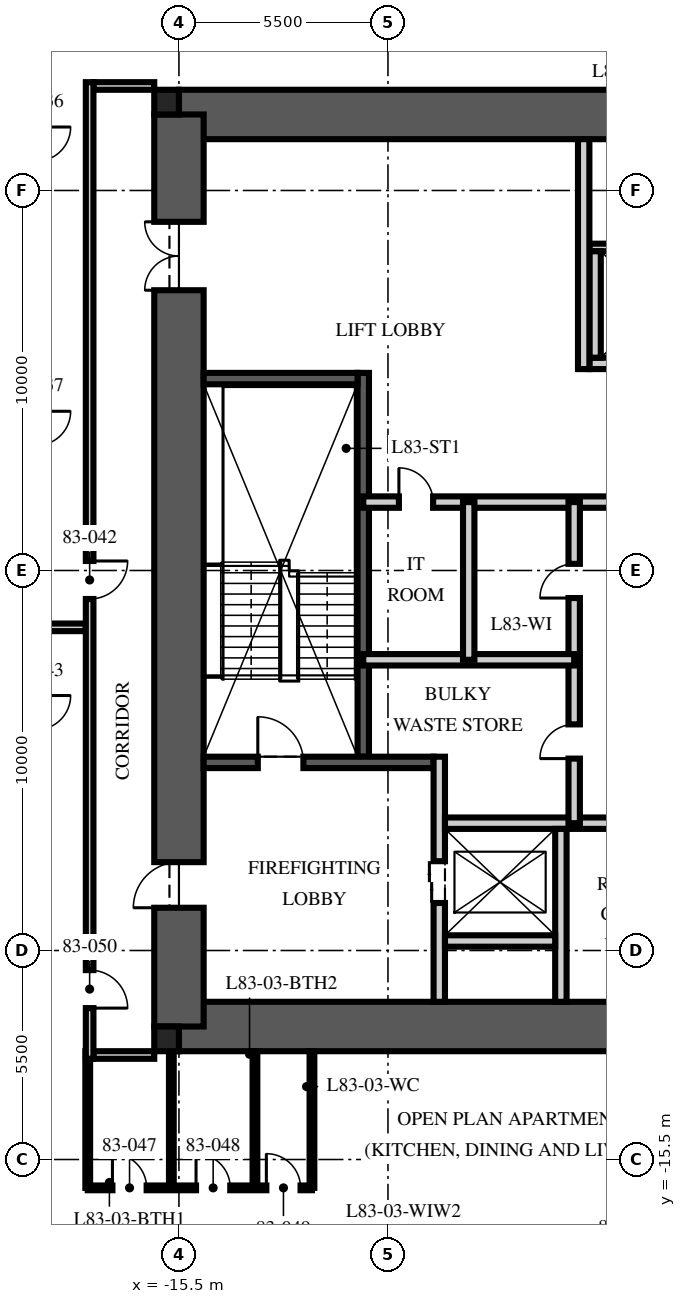
"""IFC4 building model, lengths in metres.
Left out: names, types, materials, properties, quantities, classifications, styles, units other than length and angle.
Written with IfcOpenShell. Run it as: python <this file> out.ifc"""

import sys

from ifc_helpers import new_model, si_unit, direction, frame, frame_2d, origin, origin_2d, place, context, subcontext, project, spatial, rectangle, extrude, element, fill, save


model = new_model("IFC4")
c1 = context("Model", 3, precision=1e-05, world=origin(), true_north=direction((0.0, 1.0)))
c2 = subcontext(c1, "Body", "Model", "MODEL_VIEW")
j1 = project(units=[si_unit("LENGTHUNIT", "METRE"), si_unit("PLANEANGLEUNIT", "RADIAN")], contexts=[c1])
p1 = place(None, origin())
s1 = spatial("IfcSite", under=j1, at=p1, CompositionType="ELEMENT")
p2 = place(p1, origin())
s2 = spatial("IfcBuilding", under=s1, at=p2, CompositionType="ELEMENT")
p3 = place(p2, frame((0.0, 0.0, 330.75)))
s3 = spatial("IfcBuildingStorey", under=s2, at=p3, CompositionType="ELEMENT", Elevation=330.75)
for number, where, z_axis, x_axis in (
    (1, (-15.5, 12.0, -0.25), (0.0, 0.0, 1.0), (1.0, 0.0, 0.0)),
    (2, (-15.5, -12.0, -0.25), (0.0, 0.0, 1.0), (1.0, 0.0, 0.0)),
):
    element("IfcWall", number, at=place(p3, frame(where, z_axis=z_axis, x_axis=x_axis)), inside=s3, PredefinedType="SHEAR", context=c2, shape_type="SweptSolid", body=[
        extrude(rectangle(XDim=31.0, YDim=1.3, at=frame_2d((15.5, 0.0))), origin(), (0.0, 0.0, 1.0), 3.75),
    ])
p4 = place(p3, frame((-15.5, -12.0, -0.25), z_axis=(0.0, 0.0, 1.0), x_axis=(0.0, 1.0, 0.0)))
e3 = element("IfcWall", 3, at=p4, inside=s3, PredefinedType="SHEAR", context=c2, shape_type="SweptSolid", body=[
    extrude(rectangle(XDim=24.0, YDim=1.3, at=frame_2d((12.0, 0.0))), origin(), (0.0, 0.0, 1.0), 3.75),
])
p5 = place(p4, frame((3.125, 0.0, 0.25)))
e4 = element("IfcOpeningElement", 4, at=p5, cuts=e3, PredefinedType="OPENING", context=c2, shape_type="SweptSolid", body=[
    extrude(rectangle(XDim=1.2, YDim=2.1, at=frame_2d((0.6, 1.05))), frame((0.0, 0.66, 0.0), z_axis=(0.0, -1.0, 0.0), x_axis=(1.0, 0.0, 0.0)), (0.0, 0.0, 1.0), 1.32),
])
p6 = place(p4, frame((19.375, 0.0, 0.25)))
e5 = element("IfcOpeningElement", 5, at=p6, cuts=e3, PredefinedType="OPENING", context=c2, shape_type="SweptSolid", body=[
    extrude(rectangle(XDim=1.8, YDim=2.1, at=frame_2d((0.9, 1.05))), frame((0.0, 0.66, 0.0), z_axis=(0.0, -1.0, 0.0), x_axis=(1.0, 0.0, 0.0)), (0.0, 0.0, 1.0), 1.32),
])
for number, where, z_axis, x_axis in (
    (6, (-15.825, 12.325, -0.25), (0.0, 0.0, 1.0), (1.0, 0.0, 0.0)),
    (7, (-15.825, -12.325, -0.25), (0.0, 0.0, 1.0), (1.0, 0.0, 0.0)),
):
    element("IfcColumn", number, at=place(p3, frame(where, z_axis=z_axis, x_axis=x_axis)), inside=s3, PredefinedType="COLUMN", context=c2, shape_type="SweptSolid", body=[
        extrude(rectangle(XDim=0.65, YDim=0.65, at=origin_2d()), origin(), (0.0, 0.0, 1.0), 3.75),
    ])
p7 = place(p3, frame((-10.65, -4.9, 0.0), z_axis=(0.0, 0.0, 1.0), x_axis=(0.0, 1.0, 0.0)))
e8 = element("IfcWall", 8, at=p7, inside=s3, PredefinedType="SOLIDWALL", context=c2, shape_type="SweptSolid", body=[
    extrude(rectangle(XDim=10.1, YDim=0.3, at=frame_2d((5.05, 0.0))), origin(), (0.0, 0.0, 1.0), 3.5),
])
p8 = place(p3, frame((-14.85, -5.05, 0.0), z_axis=(0.0, 0.0, 1.0), x_axis=(1.0, 0.0, 0.0)))
e9 = element("IfcWall", 9, at=p8, inside=s3, PredefinedType="SOLIDWALL", context=c2, shape_type="SweptSolid", body=[
    extrude(rectangle(XDim=6.05, YDim=0.3, at=frame_2d((3.025, 0.0))), origin(), (0.0, 0.0, 1.0), 3.5),
])
p9 = place(p8, frame((1.425, 0.0, 0.0)))
e10 = element("IfcOpeningElement", 10, at=p9, cuts=e9, PredefinedType="OPENING", context=c2, shape_type="SweptSolid", body=[
    extrude(rectangle(XDim=1.2, YDim=2.1, at=frame_2d((0.6, 1.05))), frame((0.0, 0.16, 0.0), z_axis=(0.0, -1.0, 0.0), x_axis=(1.0, 0.0, 0.0)), (0.0, 0.0, 1.0), 0.32),
])
p10 = place(p3, frame((-14.85, 5.05, 0.0), z_axis=(0.0, 0.0, 1.0), x_axis=(1.0, 0.0, 0.0)))
e11 = element("IfcWall", 11, at=p10, inside=s3, PredefinedType="SOLIDWALL", context=c2, shape_type="SweptSolid", body=[
    extrude(rectangle(XDim=4.05, YDim=0.3, at=frame_2d((2.025, 0.0))), origin(), (0.0, 0.0, 1.0), 3.5),
])
p11 = place(p3, frame((-8.65, -11.35, 0.0), z_axis=(0.0, 0.0, 1.0), x_axis=(0.0, 1.0, 0.0)))
e12 = element("IfcWall", 12, at=p11, inside=s3, PredefinedType="PARTITIONING", context=c2, shape_type="SweptSolid", body=[
    extrude(rectangle(XDim=6.45, YDim=0.3, at=frame_2d((3.225, 0.0))), origin(), (0.0, 0.0, 1.0), 3.5),
])
p12 = place(p11, frame((2.6, 0.0, 0.0)))
e13 = element("IfcOpeningElement", 13, at=p12, cuts=e12, PredefinedType="OPENING", context=c2, shape_type="SweptSolid", body=[
    extrude(rectangle(XDim=1.1, YDim=2.1, at=frame_2d((0.55, 1.05))), frame((0.0, 0.16, 0.0), z_axis=(0.0, -1.0, 0.0), x_axis=(1.0, 0.0, 0.0)), (0.0, 0.0, 1.0), 0.32),
])
p13 = place(p3, frame((-8.5, -6.65, 0.0), z_axis=(0.0, 0.0, 1.0), x_axis=(1.0, 0.0, 0.0)))
e14 = element("IfcWall", 14, at=p13, inside=s3, PredefinedType="PARTITIONING", context=c2, shape_type="SweptSolid", body=[
    extrude(rectangle(XDim=17.0, YDim=0.3, at=frame_2d((8.5, 0.0))), origin(), (0.0, 0.0, 1.0), 3.5),
])
p14 = place(p13, frame((7.8, 0.0, 0.0)))
e15 = element("IfcOpeningElement", 15, at=p14, cuts=e14, PredefinedType="OPENING", context=c2, shape_type="SweptSolid", body=[
    extrude(rectangle(XDim=1.3, YDim=2.4, at=frame_2d((0.65, 1.2))), frame((0.0, 0.16, 0.0), z_axis=(0.0, -1.0, 0.0), x_axis=(1.0, 0.0, 0.0)), (0.0, 0.0, 1.0), 0.32),
])
p15 = place(p13, frame((5.65, 0.0, 0.0)))
e16 = element("IfcOpeningElement", 16, at=p15, cuts=e14, PredefinedType="OPENING", context=c2, shape_type="SweptSolid", body=[
    extrude(rectangle(XDim=0.9, YDim=2.1, at=frame_2d((0.45, 1.05))), frame((0.0, 0.16, 0.0), z_axis=(0.0, -1.0, 0.0), x_axis=(1.0, 0.0, 0.0)), (0.0, 0.0, 1.0), 0.32),
])
p16 = place(p13, frame((10.4, 0.0, 0.0)))
e17 = element("IfcOpeningElement", 17, at=p16, cuts=e14, PredefinedType="OPENING", context=c2, shape_type="SweptSolid", body=[
    extrude(rectangle(XDim=0.9, YDim=2.1, at=frame_2d((0.45, 1.05))), frame((0.0, 0.16, 0.0), z_axis=(0.0, -1.0, 0.0), x_axis=(1.0, 0.0, 0.0)), (0.0, 0.0, 1.0), 0.32),
])
p17 = place(p3, frame((-5.45, -11.35, 0.0), z_axis=(0.0, 0.0, 1.0), x_axis=(0.0, 1.0, 0.0)))
e18 = element("IfcWall", 18, at=p17, inside=s3, PredefinedType="PARTITIONING", context=c2, shape_type="SweptSolid", body=[
    extrude(rectangle(XDim=4.55, YDim=0.3, at=frame_2d((2.275, 0.0))), origin(), (0.0, 0.0, 1.0), 3.5),
])
p18 = place(p3, frame((-8.5, -9.75, 0.0), z_axis=(0.0, 0.0, 1.0), x_axis=(1.0, 0.0, 0.0)))
e19 = element("IfcWall", 19, at=p18, inside=s3, PredefinedType="PARTITIONING", context=c2, shape_type="SweptSolid", body=[
    extrude(rectangle(XDim=2.9, YDim=0.3, at=frame_2d((1.45, 0.0))), origin(), (0.0, 0.0, 1.0), 3.5),
])
p19 = place(p3, frame((-4.7, 5.45, 0.0), z_axis=(0.0, 0.0, 1.0), x_axis=(1.0, 0.0, 0.0)))
e20 = element("IfcWall", 20, at=p19, inside=s3, PredefinedType="PARTITIONING", context=c2, shape_type="SweptSolid", body=[
    extrude(rectangle(XDim=9.7, YDim=0.3, at=frame_2d((4.85, 0.0))), origin(), (0.0, 0.0, 1.0), 3.5),
])
p20 = place(p19, frame((1.2, 0.0, 0.0)))
e21 = element("IfcOpeningElement", 21, at=p20, cuts=e20, PredefinedType="OPENING", context=c2, shape_type="SweptSolid", body=[
    extrude(rectangle(XDim=1.1, YDim=2.1, at=frame_2d((0.55, 1.05))), frame((0.0, 0.16, 0.0), z_axis=(0.0, -1.0, 0.0), x_axis=(1.0, 0.0, 0.0)), (0.0, 0.0, 1.0), 0.32),
])
p21 = place(p19, frame((4.3, 0.0, 0.0)))
e22 = element("IfcOpeningElement", 22, at=p21, cuts=e20, PredefinedType="OPENING", context=c2, shape_type="SweptSolid", body=[
    extrude(rectangle(XDim=1.1, YDim=2.1, at=frame_2d((0.55, 1.05))), frame((0.0, 0.16, 0.0), z_axis=(0.0, -1.0, 0.0), x_axis=(1.0, 0.0, 0.0)), (0.0, 0.0, 1.0), 0.32),
])
p22 = place(p19, frame((7.4, 0.0, 0.0)))
e23 = element("IfcOpeningElement", 23, at=p22, cuts=e20, PredefinedType="OPENING", context=c2, shape_type="SweptSolid", body=[
    extrude(rectangle(XDim=1.1, YDim=2.1, at=frame_2d((0.55, 1.05))), frame((0.0, 0.16, 0.0), z_axis=(0.0, -1.0, 0.0), x_axis=(1.0, 0.0, 0.0)), (0.0, 0.0, 1.0), 0.32),
])
p23 = place(p3, frame((-4.7, 8.5, 0.0), z_axis=(0.0, 0.0, 1.0), x_axis=(1.0, 0.0, 0.0)))
e24 = element("IfcWall", 24, at=p23, inside=s3, PredefinedType="PARTITIONING", context=c2, shape_type="SweptSolid", body=[
    extrude(rectangle(XDim=9.7, YDim=0.2, at=frame_2d((4.85, 0.0))), origin(), (0.0, 0.0, 1.0), 3.5),
])
p24 = place(p3, frame((-4.55, 5.6, 0.0), z_axis=(0.0, 0.0, 1.0), x_axis=(0.0, 1.0, 0.0)))
e25 = element("IfcWall", 25, at=p24, inside=s3, PredefinedType="PARTITIONING", context=c2, shape_type="SweptSolid", body=[
    extrude(rectangle(XDim=2.8, YDim=0.3, at=frame_2d((1.4, 0.0))), origin(), (0.0, 0.0, 1.0), 3.5),
])
p25 = place(p3, frame((-10.65, 1.8, 0.0), z_axis=(0.0, 0.0, 1.0), x_axis=(1.0, 0.0, 0.0)))
e26 = element("IfcWall", 26, at=p25, inside=s3, PredefinedType="PARTITIONING", context=c2, shape_type="SweptSolid", body=[
    extrude(rectangle(XDim=21.3, YDim=0.3, at=frame_2d((10.65, 0.0))), origin(), (0.0, 0.0, 1.0), 3.5),
])
p26 = place(p25, frame((10.05, 0.0, 0.0)))
e27 = element("IfcOpeningElement", 27, at=p26, cuts=e26, PredefinedType="OPENING", context=c2, shape_type="SweptSolid", body=[
    extrude(rectangle(XDim=1.2, YDim=2.1, at=frame_2d((0.6, 1.05))), frame((0.0, 0.16, 0.0), z_axis=(0.0, -1.0, 0.0), x_axis=(1.0, 0.0, 0.0)), (0.0, 0.0, 1.0), 0.32),
])
p27 = place(p25, frame((0.938, 0.0, 0.0)))
e28 = element("IfcOpeningElement", 28, at=p27, cuts=e26, PredefinedType="OPENING", context=c2, shape_type="SweptSolid", body=[
    extrude(rectangle(XDim=0.9, YDim=2.1, at=frame_2d((0.45, 1.05))), frame((0.0, 0.16, 0.0), z_axis=(0.0, -1.0, 0.0), x_axis=(1.0, 0.0, 0.0)), (0.0, 0.0, 1.0), 0.32),
])
p28 = place(p3, frame((-5.1, -6.65, 0.0), z_axis=(0.0, 0.0, 1.0), x_axis=(0.0, 1.0, 0.0)))
e29 = element("IfcWall", 29, at=p28, inside=s3, PredefinedType="PARTITIONING", context=c2, shape_type="SweptSolid", body=[
    extrude(rectangle(XDim=8.45, YDim=0.3, at=frame_2d((4.225, 0.0))), origin(), (0.0, 0.0, 1.0), 3.5),
])
p29 = place(p28, frame((1.7, 0.0, 0.0)))
e30 = element("IfcOpeningElement", 30, at=p29, cuts=e29, PredefinedType="OPENING", context=c2, shape_type="SweptSolid", body=[
    extrude(rectangle(XDim=0.9, YDim=2.1, at=frame_2d((0.45, 1.05))), frame((0.0, 0.16, 0.0), z_axis=(0.0, -1.0, 0.0), x_axis=(1.0, 0.0, 0.0)), (0.0, 0.0, 1.0), 0.32),
])
p30 = place(p28, frame((5.925, 0.0, 0.0)))
e31 = element("IfcOpeningElement", 31, at=p30, cuts=e29, PredefinedType="OPENING", context=c2, shape_type="SweptSolid", body=[
    extrude(rectangle(XDim=0.9, YDim=2.1, at=frame_2d((0.45, 1.05))), frame((0.0, 0.16, 0.0), z_axis=(0.0, -1.0, 0.0), x_axis=(1.0, 0.0, 0.0)), (0.0, 0.0, 1.0), 0.32),
])
p31 = place(p3, frame((-10.65, -2.35, 0.0), z_axis=(0.0, 0.0, 1.0), x_axis=(1.0, 0.0, 0.0)))
e32 = element("IfcWall", 32, at=p31, inside=s3, PredefinedType="PARTITIONING", context=c2, shape_type="SweptSolid", body=[
    extrude(rectangle(XDim=5.55, YDim=0.3, at=frame_2d((2.775, 0.0))), origin(), (0.0, 0.0, 1.0), 3.5),
])
p32 = place(p3, frame((-7.875, -2.35, 0.0), z_axis=(0.0, 0.0, 1.0), x_axis=(0.0, 1.0, 0.0)))
e33 = element("IfcWall", 33, at=p32, inside=s3, PredefinedType="PARTITIONING", context=c2, shape_type="SweptSolid", body=[
    extrude(rectangle(XDim=4.15, YDim=0.3, at=frame_2d((2.075, 0.0))), origin(), (0.0, 0.0, 1.0), 3.5),
])
p33 = place(p3, frame((-4.85, 5.3, 0.0), z_axis=(0.0, 0.0, 1.0), x_axis=(0.0, 1.0, 0.0)))
e34 = element("IfcWall", 34, at=p33, inside=s3, PredefinedType="PARTITIONING", context=c2, shape_type="SweptSolid", body=[
    extrude(rectangle(XDim=6.05, YDim=0.3, at=frame_2d((3.025, 0.0))), origin(), (0.0, 0.0, 1.0), 3.5),
])
for number, where, z_axis, x_axis in (
    (35, (-16.15, 12.75, 0.0), (0.0, 0.0, 1.0), (-1.0, 0.0, 0.0)),
    (36, (-16.15, -12.75, 0.0), (0.0, 0.0, 1.0), (-1.0, 0.0, 0.0)),
):
    element("IfcWall", number, at=place(p3, frame(where, z_axis=z_axis, x_axis=x_axis)), inside=s3, PredefinedType="PARTITIONING", context=c2, shape_type="SweptSolid", body=[
        extrude(rectangle(XDim=1.6, YDim=0.2, at=frame_2d((0.8, 0.0))), origin(), (0.0, 0.0, 1.0), 2.6),
    ])
p34 = place(p3, frame((-17.95, -1.496, 0.0), z_axis=(0.0, 0.0, 1.0), x_axis=(-1.0, 0.0, 0.0)))
e37 = element("IfcWall", 37, at=p34, inside=s3, PredefinedType="PARTITIONING", context=c2, shape_type="SweptSolid", body=[
    extrude(rectangle(XDim=5.05, YDim=0.2, at=frame_2d((2.525, 0.0))), origin(), (0.0, 0.0, 1.0), 3.01),
])
p35 = place(p3, frame((-17.9, -16.246, 0.0), z_axis=(0.0, 0.0, 1.0), x_axis=(1.0, 0.0, 0.0)))
e38 = element("IfcWall", 38, at=p35, inside=s3, PredefinedType="PARTITIONING", context=c2, shape_type="SweptSolid", body=[
    extrude(rectangle(XDim=5.9, YDim=0.125, at=frame_2d((2.95, 0.0))), origin(), (0.0, 0.0, 1.0), 2.6),
])
p36 = place(p35, frame((0.65, 0.0, 0.0)))
e39 = element("IfcOpeningElement", 39, at=p36, cuts=e38, PredefinedType="OPENING", context=c2, shape_type="SweptSolid", body=[
    extrude(rectangle(XDim=0.9, YDim=2.1, at=frame_2d((0.45, 1.05))), frame((0.0, 0.073, 0.0), z_axis=(0.0, -1.0, 0.0), x_axis=(1.0, 0.0, 0.0)), (0.0, 0.0, 1.0), 0.145),
])
p37 = place(p35, frame((2.85, 0.0, 0.0)))
e40 = element("IfcOpeningElement", 40, at=p37, cuts=e38, PredefinedType="OPENING", context=c2, shape_type="SweptSolid", body=[
    extrude(rectangle(XDim=0.9, YDim=2.1, at=frame_2d((0.45, 1.05))), frame((0.0, 0.073, 0.0), z_axis=(0.0, -1.0, 0.0), x_axis=(1.0, 0.0, 0.0)), (0.0, 0.0, 1.0), 0.145),
])
p38 = place(p35, frame((4.7, 0.0, 0.0)))
e41 = element("IfcOpeningElement", 41, at=p38, cuts=e38, PredefinedType="OPENING", context=c2, shape_type="SweptSolid", body=[
    extrude(rectangle(XDim=0.9, YDim=2.1, at=frame_2d((0.45, 1.05))), frame((0.0, 0.073, 0.0), z_axis=(0.0, -1.0, 0.0), x_axis=(1.0, 0.0, 0.0)), (0.0, 0.0, 1.0), 0.145),
])
for number, where, z_axis, x_axis in (
    (42, (-17.9, -12.65, 0.0), (0.0, 0.0, 1.0), (0.0, -1.0, 0.0)),
    (43, (-15.7, -12.65, 0.0), (0.0, 0.0, 1.0), (0.0, -1.0, 0.0)),
):
    element("IfcWall", number, at=place(p3, frame(where, z_axis=z_axis, x_axis=x_axis)), inside=s3, PredefinedType="PARTITIONING", context=c2, shape_type="SweptSolid", body=[
        extrude(rectangle(XDim=3.596, YDim=0.125, at=frame_2d((1.798, 0.0))), origin(), (0.0, 0.0, 1.0), 2.6),
    ])
for number, where, z_axis, x_axis in (
    (44, (-13.5, -12.65, 0.0), (0.0, 0.0, 1.0), (0.0, -1.0, 0.0)),
    (45, (-12.0, -12.65, 0.0), (0.0, 0.0, 1.0), (0.0, -1.0, 0.0)),
):
    element("IfcWall", number, at=place(p3, frame(where, z_axis=z_axis, x_axis=x_axis)), inside=s3, PredefinedType="PARTITIONING", context=c2, shape_type="SweptSolid", body=[
        extrude(rectangle(XDim=3.596, YDim=0.125, at=frame_2d((1.798, 0.0))), origin(), (0.0, 0.0, 1.0), 3.5),
    ])
p39 = place(p3, frame((-17.85, 12.85, 0.0), z_axis=(0.0, 0.0, 1.0), x_axis=(0.0, -1.0, 0.0)))
e46 = element("IfcWall", 46, at=p39, inside=s3, PredefinedType="PARTITIONING", context=c2, shape_type="SweptSolid", body=[
    extrude(rectangle(XDim=25.7, YDim=0.2, at=frame_2d((12.85, 0.0))), origin(), (0.0, 0.0, 1.0), 2.9),
])
p40 = place(p39, frame((12.6, 0.0, 0.0)))
e47 = element("IfcOpeningElement", 47, at=p40, cuts=e46, PredefinedType="OPENING", context=c2, shape_type="SweptSolid", body=[
    extrude(rectangle(XDim=1.0, YDim=2.2, at=frame_2d((0.5, 1.1))), frame((0.0, 0.11, 0.0), z_axis=(0.0, -1.0, 0.0), x_axis=(1.0, 0.0, 0.0)), (0.0, 0.0, 1.0), 0.22),
])
p41 = place(p39, frame((23.366, 0.0, 0.0)))
e48 = element("IfcOpeningElement", 48, at=p41, cuts=e46, PredefinedType="OPENING", context=c2, shape_type="SweptSolid", body=[
    extrude(rectangle(XDim=1.0, YDim=2.2, at=frame_2d((0.5, 1.1))), frame((0.0, 0.11, 0.0), z_axis=(0.0, -1.0, 0.0), x_axis=(1.0, 0.0, 0.0)), (0.0, 0.0, 1.0), 0.22),
])
p42 = place(p9, origin())
e49 = element("IfcDoor", 49, at=p42, inside=s3, OperationType="SINGLE_SWING_LEFT", PredefinedType="DOOR", context=c2, shape_type="SweptSolid", body=[
    extrude(rectangle(XDim=1.2, YDim=2.1, at=frame_2d((0.6, 1.05))), frame((0.0, 0.025, 0.0), z_axis=(0.0, -1.0, 0.0), x_axis=(1.0, 0.0, 0.0)), (0.0, 0.0, 1.0), 0.05),
])
fill(e10, e49)
p43 = place(p5, origin())
e50 = element("IfcDoor", 50, at=p43, inside=s3, OperationType="SINGLE_SWING_LEFT", PredefinedType="DOOR", context=c2, shape_type="SweptSolid", body=[
    extrude(rectangle(XDim=1.2, YDim=2.1, at=frame_2d((0.6, 1.05))), frame((0.0, 0.025, 0.0), z_axis=(0.0, -1.0, 0.0), x_axis=(1.0, 0.0, 0.0)), (0.0, 0.0, 1.0), 0.05),
])
fill(e4, e50)
p44 = place(p6, origin())
e51 = element("IfcDoor", 51, at=p44, inside=s3, OperationType="DOUBLE_DOOR_SINGLE_SWING", PredefinedType="DOOR", context=c2, shape_type="SweptSolid", body=[
    extrude(rectangle(XDim=1.8, YDim=2.1, at=frame_2d((0.9, 1.05))), frame((0.0, 0.025, 0.0), z_axis=(0.0, -1.0, 0.0), x_axis=(1.0, 0.0, 0.0)), (0.0, 0.0, 1.0), 0.05),
])
fill(e5, e51)
p45 = place(p12, origin())
e52 = element("IfcDoor", 52, at=p45, inside=s3, OperationType="DOUBLE_DOOR_SLIDING", PredefinedType="DOOR", context=c2, shape_type="SweptSolid", body=[
    extrude(rectangle(XDim=1.1, YDim=2.1, at=frame_2d((0.55, 1.05))), frame((0.0, 0.025, 0.0), z_axis=(0.0, -1.0, 0.0), x_axis=(1.0, 0.0, 0.0)), (0.0, 0.0, 1.0), 0.05),
])
fill(e13, e52)
p46 = place(p29, origin())
e53 = element("IfcDoor", 53, at=p46, inside=s3, OperationType="SINGLE_SWING_LEFT", PredefinedType="DOOR", context=c2, shape_type="SweptSolid", body=[
    extrude(rectangle(XDim=0.9, YDim=2.1, at=frame_2d((0.45, 1.05))), frame((0.0, 0.025, 0.0), z_axis=(0.0, -1.0, 0.0), x_axis=(1.0, 0.0, 0.0)), (0.0, 0.0, 1.0), 0.05),
])
fill(e30, e53)
p47 = place(p30, origin())
e54 = element("IfcDoor", 54, at=p47, inside=s3, OperationType="SINGLE_SWING_LEFT", PredefinedType="DOOR", context=c2, shape_type="SweptSolid", body=[
    extrude(rectangle(XDim=0.9, YDim=2.1, at=frame_2d((0.45, 1.05))), frame((0.0, 0.025, 0.0), z_axis=(0.0, -1.0, 0.0), x_axis=(1.0, 0.0, 0.0)), (0.0, 0.0, 1.0), 0.05),
])
fill(e31, e54)
p48 = place(p27, origin())
e55 = element("IfcDoor", 55, at=p48, inside=s3, OperationType="SINGLE_SWING_LEFT", PredefinedType="DOOR", context=c2, shape_type="SweptSolid", body=[
    extrude(rectangle(XDim=0.9, YDim=2.1, at=frame_2d((0.45, 1.05))), frame((0.0, 0.025, 0.0), z_axis=(0.0, -1.0, 0.0), x_axis=(1.0, 0.0, 0.0)), (0.0, 0.0, 1.0), 0.05),
])
fill(e28, e55)
p49 = place(p40, origin())
e56 = element("IfcDoor", 56, at=p49, inside=s3, OperationType="SINGLE_SWING_LEFT", PredefinedType="DOOR", context=c2, shape_type="SweptSolid", body=[
    extrude(rectangle(XDim=1.0, YDim=2.2, at=frame_2d((0.5, 1.1))), frame((0.0, 0.025, 0.0), z_axis=(0.0, -1.0, 0.0), x_axis=(1.0, 0.0, 0.0)), (0.0, 0.0, 1.0), 0.05),
])
fill(e47, e56)
p50 = place(p36, origin())
e57 = element("IfcDoor", 57, at=p50, inside=s3, OperationType="SINGLE_SWING_LEFT", PredefinedType="DOOR", context=c2, shape_type="SweptSolid", body=[
    extrude(rectangle(XDim=0.9, YDim=2.1, at=frame_2d((0.45, 1.05))), frame((0.0, 0.025, 0.0), z_axis=(0.0, -1.0, 0.0), x_axis=(1.0, 0.0, 0.0)), (0.0, 0.0, 1.0), 0.05),
])
fill(e39, e57)
p51 = place(p37, origin())
e58 = element("IfcDoor", 58, at=p51, inside=s3, OperationType="SINGLE_SWING_LEFT", PredefinedType="DOOR", context=c2, shape_type="SweptSolid", body=[
    extrude(rectangle(XDim=0.9, YDim=2.1, at=frame_2d((0.45, 1.05))), frame((0.0, 0.025, 0.0), z_axis=(0.0, -1.0, 0.0), x_axis=(1.0, 0.0, 0.0)), (0.0, 0.0, 1.0), 0.05),
])
fill(e40, e58)
p52 = place(p38, origin())
e59 = element("IfcDoor", 59, at=p52, inside=s3, OperationType="SINGLE_SWING_LEFT", PredefinedType="DOOR", context=c2, shape_type="SweptSolid", body=[
    extrude(rectangle(XDim=0.9, YDim=2.1, at=frame_2d((0.45, 1.05))), frame((0.0, 0.025, 0.0), z_axis=(0.0, -1.0, 0.0), x_axis=(1.0, 0.0, 0.0)), (0.0, 0.0, 1.0), 0.05),
])
fill(e41, e59)
p53 = place(p41, origin())
e60 = element("IfcDoor", 60, at=p53, inside=s3, OperationType="SINGLE_SWING_RIGHT", PredefinedType="DOOR", context=c2, shape_type="SweptSolid", body=[
    extrude(rectangle(XDim=1.0, YDim=2.2, at=frame_2d((0.5, 1.1))), frame((0.0, 0.025, 0.0), z_axis=(0.0, -1.0, 0.0), x_axis=(1.0, 0.0, 0.0)), (0.0, 0.0, 1.0), 0.05),
])
fill(e48, e60)
save(model, sys.argv[1])
